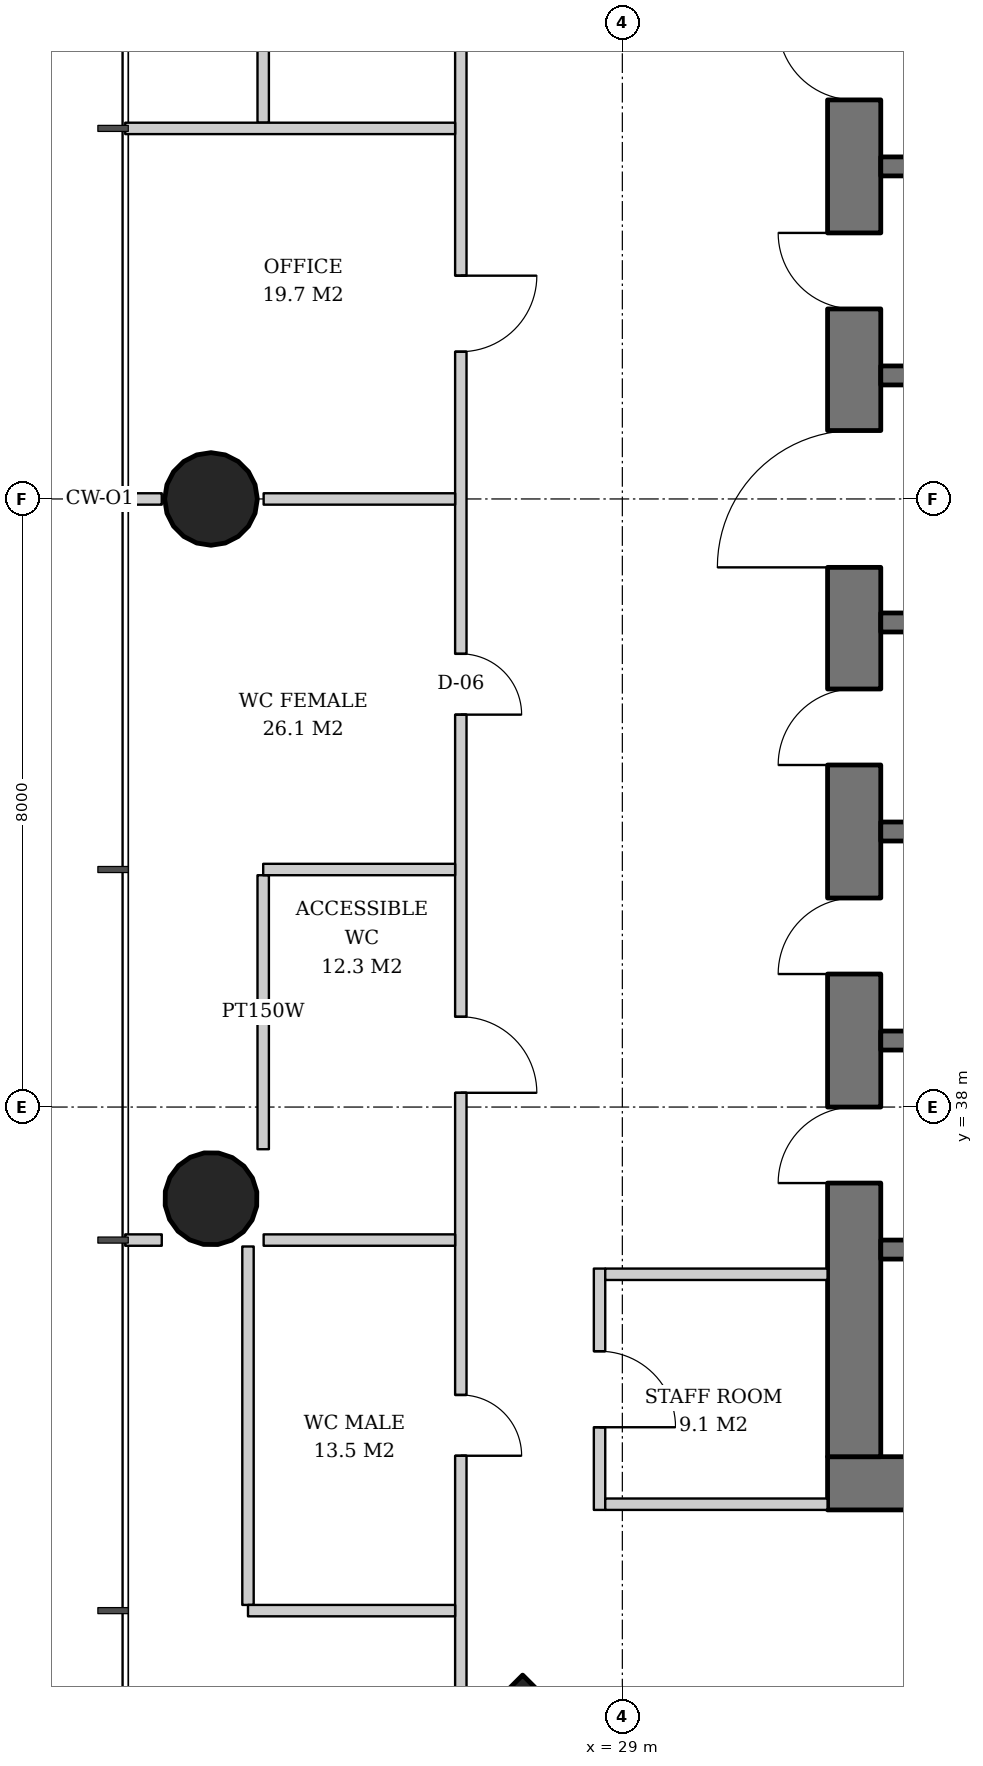
"""IFC4 building model, lengths in metres.
Left out: names, types, materials, properties, quantities, classifications, styles, units other than length and angle.
Written with IfcOpenShell. Run it as: python <this file> out.ifc"""

import sys

from ifc_helpers import new_model, si_unit, direction, frame, frame_2d, origin, origin_2d, place, context, subcontext, project, spatial, rectangle, hollow_circle, extrude, element, fill, save


model = new_model("IFC4")
c1 = context("Model", 3, precision=1e-05, world=origin(), true_north=direction((0.0, 1.0)))
c2 = subcontext(c1, "Body", "Model", "MODEL_VIEW")
j1 = project(units=[si_unit("LENGTHUNIT", "METRE"), si_unit("PLANEANGLEUNIT", "RADIAN")], contexts=[c1])
p1 = place(None, origin())
s1 = spatial("IfcSite", under=j1, at=p1, CompositionType="ELEMENT")
p2 = place(p1, origin())
s2 = spatial("IfcBuilding", under=s1, at=p2, CompositionType="ELEMENT")
p3 = place(p2, frame((0.0, 0.0, 100.8)))
s3 = spatial("IfcBuildingStorey", under=s2, at=p3, CompositionType="ELEMENT", Elevation=100.8)
p4 = place(p3, frame((27.65, 28.65, 0.0), z_axis=(0.031962158256, 0.031962158256, 0.998977898093), x_axis=(-0.707106781187, 0.707106781187, 0.0)))
e1 = element("IfcColumn", 1, at=p4, inside=s3, PredefinedType="COLUMN", context=c2, shape_type="SweptSolid", body=[
    extrude(rectangle(XDim=2.6, YDim=2.6, at=origin_2d()), origin(), (0.0, 0.0, 1.0), 3.804),
])
p5 = place(p3, frame((23.55, 46.0, 0.0), z_axis=(0.031914348339, 0.0, 0.999490607445), x_axis=(0.0, 1.0, 0.0)))
e2 = element("IfcColumn", 2, at=p5, inside=s3, PredefinedType="COLUMN", context=c2, shape_type="SweptSolid", body=[
    extrude(hollow_circle(Radius=0.61, WallThickness=0.04, at=origin_2d()), origin(), (0.0, 0.0, 1.0), 3.802),
])
p6 = place(p3, frame((23.55, 36.775, 0.0), z_axis=(0.031910269556, 0.015987237665, 0.999362868496), x_axis=(-0.447933021895, 0.894067115991, 0.0)))
e3 = element("IfcColumn", 3, at=p6, inside=s3, PredefinedType="COLUMN", context=c2, shape_type="SweptSolid", body=[
    extrude(hollow_circle(Radius=0.61, WallThickness=0.04, at=origin_2d()), origin(), (0.0, 0.0, 1.0), 3.802),
])
p7 = place(p3, frame((31.7, 33.05, 0.0), z_axis=(0.0, 0.0, 1.0), x_axis=(1.0, 0.0, 0.0)))
e4 = element("IfcWall", 4, at=p7, inside=s3, PredefinedType="SHEAR", context=c2, shape_type="SweptSolid", body=[
    extrude(rectangle(XDim=26.6, YDim=0.7, at=frame_2d((13.3, 0.0))), origin(), (0.0, 0.0, 1.0), 3.8),
])
p8 = place(p7, frame((7.3, 0.0, 0.0)))
e5 = element("IfcOpeningElement", 5, at=p8, cuts=e4, PredefinedType="OPENING", context=c2, shape_type="SweptSolid", body=[
    extrude(rectangle(XDim=1.0, YDim=2.1, at=frame_2d((0.5, 1.05))), frame((0.0, 0.36, 0.0), z_axis=(0.0, -1.0, 0.0), x_axis=(1.0, 0.0, 0.0)), (0.0, 0.0, 1.0), 0.72),
])
p9 = place(p7, frame((18.75, 0.0, 0.0)))
e6 = element("IfcOpeningElement", 6, at=p9, cuts=e4, PredefinedType="OPENING", context=c2, shape_type="SweptSolid", body=[
    extrude(rectangle(XDim=1.0, YDim=2.1, at=frame_2d((0.5, 1.05))), frame((0.0, 0.36, 0.0), z_axis=(0.0, -1.0, 0.0), x_axis=(1.0, 0.0, 0.0)), (0.0, 0.0, 1.0), 0.72),
])
p10 = place(p7, frame((3.2, 0.0, 0.0)))
e7 = element("IfcOpeningElement", 7, at=p10, cuts=e4, PredefinedType="OPENING", context=c2, shape_type="SweptSolid", body=[
    extrude(rectangle(XDim=1.0, YDim=2.1, at=frame_2d((0.5, 1.05))), frame((0.0, 0.36, 0.0), z_axis=(0.0, -1.0, 0.0), x_axis=(1.0, 0.0, 0.0)), (0.0, 0.0, 1.0), 0.72),
])
p11 = place(p7, frame((10.42, 0.0, 0.0)))
e8 = element("IfcOpeningElement", 8, at=p11, cuts=e4, PredefinedType="OPENING", context=c2, shape_type="SweptSolid", body=[
    extrude(rectangle(XDim=1.0, YDim=2.1, at=frame_2d((0.5, 1.05))), frame((0.0, 0.36, 0.0), z_axis=(0.0, -1.0, 0.0), x_axis=(1.0, 0.0, 0.0)), (0.0, 0.0, 1.0), 0.72),
])
p12 = place(p7, frame((14.46, 0.0, 0.0)))
e9 = element("IfcOpeningElement", 9, at=p12, cuts=e4, PredefinedType="OPENING", context=c2, shape_type="SweptSolid", body=[
    extrude(rectangle(XDim=1.0, YDim=2.1, at=frame_2d((0.5, 1.05))), frame((0.0, 0.36, 0.0), z_axis=(0.0, -1.0, 0.0), x_axis=(1.0, 0.0, 0.0)), (0.0, 0.0, 1.0), 0.72),
])
p13 = place(p7, frame((22.5, 0.0, 0.0)))
e10 = element("IfcOpeningElement", 10, at=p13, cuts=e4, PredefinedType="OPENING", context=c2, shape_type="SweptSolid", body=[
    extrude(rectangle(XDim=1.0, YDim=2.1, at=frame_2d((0.5, 1.05))), frame((0.0, 0.36, 0.0), z_axis=(0.0, -1.0, 0.0), x_axis=(1.0, 0.0, 0.0)), (0.0, 0.0, 1.0), 0.72),
])
p14 = place(p3, frame((32.05, 33.4, 0.0), z_axis=(0.0, 0.0, 1.0), x_axis=(0.0, 1.0, 0.0)))
e11 = element("IfcWall", 11, at=p14, inside=s3, PredefinedType="SHEAR", context=c2, shape_type="SweptSolid", body=[
    extrude(rectangle(XDim=25.2, YDim=0.7, at=frame_2d((12.6, 0.0))), origin(), (0.0, 0.0, 1.0), 3.8),
])
p15 = place(p14, frame((11.7, 0.0, 0.0)))
e12 = element("IfcOpeningElement", 12, at=p15, cuts=e11, PredefinedType="OPENING", context=c2, shape_type="SweptSolid", body=[
    extrude(rectangle(XDim=1.8, YDim=2.4, at=frame_2d((0.9, 1.2))), frame((0.0, 0.36, 0.0), z_axis=(0.0, -1.0, 0.0), x_axis=(1.0, 0.0, 0.0)), (0.0, 0.0, 1.0), 0.72),
])
p16 = place(p14, frame((3.6, 0.0, 0.0)))
e13 = element("IfcOpeningElement", 13, at=p16, cuts=e11, PredefinedType="OPENING", context=c2, shape_type="SweptSolid", body=[
    extrude(rectangle(XDim=1.0, YDim=2.1, at=frame_2d((0.5, 1.05))), frame((0.0, 0.36, 0.0), z_axis=(0.0, -1.0, 0.0), x_axis=(1.0, 0.0, 0.0)), (0.0, 0.0, 1.0), 0.72),
])
p17 = place(p14, frame((6.35, 0.0, 0.0)))
e14 = element("IfcOpeningElement", 14, at=p17, cuts=e11, PredefinedType="OPENING", context=c2, shape_type="SweptSolid", body=[
    extrude(rectangle(XDim=1.0, YDim=2.1, at=frame_2d((0.5, 1.05))), frame((0.0, 0.36, 0.0), z_axis=(0.0, -1.0, 0.0), x_axis=(1.0, 0.0, 0.0)), (0.0, 0.0, 1.0), 0.72),
])
p18 = place(p14, frame((9.1, 0.0, 0.0)))
e15 = element("IfcOpeningElement", 15, at=p18, cuts=e11, PredefinedType="OPENING", context=c2, shape_type="SweptSolid", body=[
    extrude(rectangle(XDim=1.0, YDim=2.1, at=frame_2d((0.5, 1.05))), frame((0.0, 0.36, 0.0), z_axis=(0.0, -1.0, 0.0), x_axis=(1.0, 0.0, 0.0)), (0.0, 0.0, 1.0), 0.72),
])
p19 = place(p14, frame((15.1, 0.0, 0.0)))
e16 = element("IfcOpeningElement", 16, at=p19, cuts=e11, PredefinedType="OPENING", context=c2, shape_type="SweptSolid", body=[
    extrude(rectangle(XDim=1.0, YDim=2.1, at=frame_2d((0.5, 1.05))), frame((0.0, 0.36, 0.0), z_axis=(0.0, -1.0, 0.0), x_axis=(1.0, 0.0, 0.0)), (0.0, 0.0, 1.0), 0.72),
])
p20 = place(p14, frame((17.85, 0.0, 0.0)))
e17 = element("IfcOpeningElement", 17, at=p20, cuts=e11, PredefinedType="OPENING", context=c2, shape_type="SweptSolid", body=[
    extrude(rectangle(XDim=1.0, YDim=2.1, at=frame_2d((0.5, 1.05))), frame((0.0, 0.36, 0.0), z_axis=(0.0, -1.0, 0.0), x_axis=(1.0, 0.0, 0.0)), (0.0, 0.0, 1.0), 0.72),
])
for number, where, z_axis, x_axis in (
    (18, (32.4, 36.125, 0.0), (0.0, 0.0, 1.0), (1.0, 0.0, 0.0)),
    (19, (32.4, 38.875, 0.0), (0.0, 0.0, 1.0), (1.0, 0.0, 0.0)),
    (20, (32.4, 41.625, 0.0), (0.0, 0.0, 1.0), (1.0, 0.0, 0.0)),
    (21, (32.4, 44.375, 0.0), (0.0, 0.0, 1.0), (1.0, 0.0, 0.0)),
    (22, (32.4, 47.625, 0.0), (0.0, 0.0, 1.0), (1.0, 0.0, 0.0)),
    (23, (32.4, 50.375, 0.0), (0.0, 0.0, 1.0), (1.0, 0.0, 0.0)),
):
    element("IfcWall", number, at=place(p3, frame(where, z_axis=z_axis, x_axis=x_axis)), inside=s3, PredefinedType="SHEAR", context=c2, shape_type="SweptSolid", body=[
        extrude(rectangle(XDim=2.7, YDim=0.25, at=frame_2d((1.35, 0.0))), origin(), (0.0, 0.0, 1.0), 3.8),
    ])
p21 = place(p3, frame((28.7, 35.875, 0.0), z_axis=(0.0, 0.0, 1.0), x_axis=(0.0, -1.0, 0.0)))
e24 = element("IfcWall", 24, at=p21, inside=s3, PredefinedType="PARTITIONING", context=c2, shape_type="SweptSolid", body=[
    extrude(rectangle(XDim=3.175, YDim=0.15, at=frame_2d((1.587, 0.0))), origin(), (0.0, 0.0, 1.0), 3.62),
])
p22 = place(p21, frame((1.087, 0.0, 0.0)))
e25 = element("IfcOpeningElement", 25, at=p22, cuts=e24, PredefinedType="OPENING", context=c2, shape_type="SweptSolid", body=[
    extrude(rectangle(XDim=1.0, YDim=2.1, at=frame_2d((0.5, 1.05))), frame((0.0, 0.085, 0.0), z_axis=(0.0, -1.0, 0.0), x_axis=(1.0, 0.0, 0.0)), (0.0, 0.0, 1.0), 0.17),
])
for number, where, z_axis, x_axis in (
    (26, (31.7, 35.8, 0.0), (0.0, 0.0, 1.0), (-1.0, 0.0, 0.0)),
    (27, (31.7, 32.775, 0.0), (0.0, 0.0, 1.0), (-1.0, 0.0, 0.0)),
):
    element("IfcWall", number, at=place(p3, frame(where, z_axis=z_axis, x_axis=x_axis)), inside=s3, PredefinedType="PARTITIONING", context=c2, shape_type="SweptSolid", body=[
        extrude(rectangle(XDim=2.925, YDim=0.15, at=frame_2d((1.462, 0.0))), origin(), (0.0, 0.0, 1.0), 3.62),
    ])
p23 = place(p3, frame((24.275, 54.555, 0.0), z_axis=(0.0, 0.0, 1.0), x_axis=(0.0, -1.0, 0.0)))
e28 = element("IfcWall", 28, at=p23, inside=s3, PredefinedType="PARTITIONING", context=c2, shape_type="SweptSolid", body=[
    extrude(rectangle(XDim=3.605, YDim=0.15, at=frame_2d((1.802, 0.0))), origin(), (0.0, 0.0, 1.0), 2.858),
])
p24 = place(p3, frame((24.275, 41.05, 0.0), z_axis=(0.0, 0.0, 1.0), x_axis=(0.0, -1.0, 0.0)))
e29 = element("IfcWall", 29, at=p24, inside=s3, PredefinedType="PARTITIONING", context=c2, shape_type="SweptSolid", body=[
    extrude(rectangle(XDim=3.605, YDim=0.15, at=frame_2d((1.802, 0.0))), origin(), (0.0, 0.0, 1.0), 2.806),
])
p25 = place(p3, frame((24.075, 36.166, 0.0), z_axis=(0.0, 0.0, 1.0), x_axis=(0.0, -1.0, 0.0)))
e30 = element("IfcWall", 30, at=p25, inside=s3, PredefinedType="PARTITIONING", context=c2, shape_type="SweptSolid", body=[
    extrude(rectangle(XDim=4.716, YDim=0.15, at=frame_2d((2.358, 0.0))), origin(), (0.0, 0.0, 1.0), 3.62),
])
p26 = place(p3, frame((26.875, 62.211, 0.0), z_axis=(0.0, 0.0, 1.0), x_axis=(0.0, -1.0, 0.0)))
e31 = element("IfcWall", 31, at=p26, inside=s3, PredefinedType="PARTITIONING", context=c2, shape_type="SweptSolid", body=[
    extrude(rectangle(XDim=32.423, YDim=0.15, at=frame_2d((16.211, 0.0))), origin(), (0.0, 0.0, 1.0), 2.72),
])
p27 = place(p26, frame((3.524, 0.0, 0.0)))
e32 = element("IfcOpeningElement", 32, at=p27, cuts=e31, PredefinedType="OPENING", context=c2, shape_type="SweptSolid", body=[
    extrude(rectangle(XDim=1.0, YDim=2.1, at=frame_2d((0.5, 1.05))), frame((0.0, 0.085, 0.0), z_axis=(0.0, -1.0, 0.0), x_axis=(1.0, 0.0, 0.0)), (0.0, 0.0, 1.0), 0.17),
])
p28 = place(p26, frame((8.399, 0.0, 0.0)))
e33 = element("IfcOpeningElement", 33, at=p28, cuts=e31, PredefinedType="OPENING", context=c2, shape_type="SweptSolid", body=[
    extrude(rectangle(XDim=1.0, YDim=2.1, at=frame_2d((0.5, 1.05))), frame((0.0, 0.085, 0.0), z_axis=(0.0, -1.0, 0.0), x_axis=(1.0, 0.0, 0.0)), (0.0, 0.0, 1.0), 0.17),
])
p29 = place(p26, frame((13.274, 0.0, 0.0)))
e34 = element("IfcOpeningElement", 34, at=p29, cuts=e31, PredefinedType="OPENING", context=c2, shape_type="SweptSolid", body=[
    extrude(rectangle(XDim=1.0, YDim=2.1, at=frame_2d((0.5, 1.05))), frame((0.0, 0.085, 0.0), z_axis=(0.0, -1.0, 0.0), x_axis=(1.0, 0.0, 0.0)), (0.0, 0.0, 1.0), 0.17),
])
p30 = place(p26, frame((18.249, 0.0, 0.0)))
e35 = element("IfcOpeningElement", 35, at=p30, cuts=e31, PredefinedType="OPENING", context=c2, shape_type="SweptSolid", body=[
    extrude(rectangle(XDim=0.8, YDim=2.1, at=frame_2d((0.4, 1.05))), frame((0.0, 0.085, 0.0), z_axis=(0.0, -1.0, 0.0), x_axis=(1.0, 0.0, 0.0)), (0.0, 0.0, 1.0), 0.17),
])
p31 = place(p26, frame((23.024, 0.0, 0.0)))
e36 = element("IfcOpeningElement", 36, at=p31, cuts=e31, PredefinedType="OPENING", context=c2, shape_type="SweptSolid", body=[
    extrude(rectangle(XDim=1.0, YDim=2.1, at=frame_2d((0.5, 1.05))), frame((0.0, 0.085, 0.0), z_axis=(0.0, -1.0, 0.0), x_axis=(1.0, 0.0, 0.0)), (0.0, 0.0, 1.0), 0.17),
])
p32 = place(p26, frame((27.999, 0.0, 0.0)))
e37 = element("IfcOpeningElement", 37, at=p32, cuts=e31, PredefinedType="OPENING", context=c2, shape_type="SweptSolid", body=[
    extrude(rectangle(XDim=0.8, YDim=2.1, at=frame_2d((0.4, 1.05))), frame((0.0, 0.085, 0.0), z_axis=(0.0, -1.0, 0.0), x_axis=(1.0, 0.0, 0.0)), (0.0, 0.0, 1.0), 0.17),
])
p33 = place(p3, frame((26.8, 50.875, 0.0), z_axis=(0.0, 0.0, 1.0), x_axis=(-1.0, 0.0, 0.0)))
e38 = element("IfcWall", 38, at=p33, inside=s3, PredefinedType="PARTITIONING", context=c2, shape_type="SweptSolid", body=[
    extrude(rectangle(XDim=4.34, YDim=0.15, at=frame_2d((2.17, 0.0))), origin(), (0.0, 0.0, 1.0), 2.82),
])
p34 = place(p3, frame((26.8, 46.0, 0.0), z_axis=(0.0, 0.0, 1.0), x_axis=(-1.0, 0.0, 0.0)))
e39 = element("IfcWall", 39, at=p34, inside=s3, PredefinedType="PARTITIONING", context=c2, shape_type="SweptSolid", body=[
    extrude(rectangle(XDim=2.519, YDim=0.15, at=frame_2d((1.26, 0.0))), origin(), (0.0, 0.0, 1.0), 2.858),
])
p35 = place(p3, frame((22.94, 46.0, 0.0), z_axis=(0.0, 0.0, 1.0), x_axis=(-1.0, 0.0, 0.0)))
e40 = element("IfcWall", 40, at=p35, inside=s3, PredefinedType="PARTITIONING", context=c2, shape_type="SweptSolid", body=[
    extrude(rectangle(XDim=0.48, YDim=0.15, at=frame_2d((0.24, 0.0))), origin(), (0.0, 0.0, 1.0), 3.62),
])
p36 = place(p3, frame((26.8, 41.125, 0.0), z_axis=(0.0, 0.0, 1.0), x_axis=(-1.0, 0.0, 0.0)))
e41 = element("IfcWall", 41, at=p36, inside=s3, PredefinedType="PARTITIONING", context=c2, shape_type="SweptSolid", body=[
    extrude(rectangle(XDim=2.525, YDim=0.15, at=frame_2d((1.263, 0.0))), origin(), (0.0, 0.0, 1.0), 3.62),
])
p37 = place(p3, frame((26.8, 36.25, 0.0), z_axis=(0.0, 0.0, 1.0), x_axis=(-1.0, 0.0, 0.0)))
e42 = element("IfcWall", 42, at=p37, inside=s3, PredefinedType="PARTITIONING", context=c2, shape_type="SweptSolid", body=[
    extrude(rectangle(XDim=2.519, YDim=0.15, at=frame_2d((1.26, 0.0))), origin(), (0.0, 0.0, 1.0), 3.62),
])
p38 = place(p3, frame((22.94, 36.25, 0.0), z_axis=(0.0, 0.0, 1.0), x_axis=(-1.0, 0.0, 0.0)))
e43 = element("IfcWall", 43, at=p38, inside=s3, PredefinedType="PARTITIONING", context=c2, shape_type="SweptSolid", body=[
    extrude(rectangle(XDim=0.48, YDim=0.15, at=frame_2d((0.24, 0.0))), origin(), (0.0, 0.0, 1.0), 3.62),
])
p39 = place(p3, frame((26.8, 31.375, 0.0), z_axis=(0.0, 0.0, 1.0), x_axis=(-1.0, 0.0, 0.0)))
e44 = element("IfcWall", 44, at=p39, inside=s3, PredefinedType="PARTITIONING", context=c2, shape_type="SweptSolid", body=[
    extrude(rectangle(XDim=2.725, YDim=0.15, at=frame_2d((1.363, 0.0))), origin(), (0.0, 0.0, 1.0), 3.62),
])
p40 = place(p15, origin())
e45 = element("IfcDoor", 45, at=p40, inside=s3, OperationType="DOUBLE_DOOR_SINGLE_SWING", PredefinedType="DOOR", context=c2, shape_type="SweptSolid", body=[
    extrude(rectangle(XDim=1.8, YDim=2.4, at=frame_2d((0.9, 1.2))), frame((0.0, 0.025, 0.0), z_axis=(0.0, -1.0, 0.0), x_axis=(1.0, 0.0, 0.0)), (0.0, 0.0, 1.0), 0.05),
])
fill(e12, e45)
p41 = place(p16, origin())
e46 = element("IfcDoor", 46, at=p41, inside=s3, OperationType="SINGLE_SWING_LEFT", PredefinedType="DOOR", context=c2, shape_type="SweptSolid", body=[
    extrude(rectangle(XDim=1.0, YDim=2.1, at=frame_2d((0.5, 1.05))), frame((0.0, -0.29, 0.0), z_axis=(0.0, -1.0, 0.0), x_axis=(1.0, 0.0, 0.0)), (0.0, 0.0, 1.0), 0.05),
])
fill(e13, e46)
p42 = place(p17, origin())
e47 = element("IfcDoor", 47, at=p42, inside=s3, OperationType="SINGLE_SWING_LEFT", PredefinedType="DOOR", context=c2, shape_type="SweptSolid", body=[
    extrude(rectangle(XDim=1.0, YDim=2.1, at=frame_2d((0.5, 1.05))), frame((0.0, -0.29, 0.0), z_axis=(0.0, -1.0, 0.0), x_axis=(1.0, 0.0, 0.0)), (0.0, 0.0, 1.0), 0.05),
])
fill(e14, e47)
p43 = place(p18, origin())
e48 = element("IfcDoor", 48, at=p43, inside=s3, OperationType="SINGLE_SWING_LEFT", PredefinedType="DOOR", context=c2, shape_type="SweptSolid", body=[
    extrude(rectangle(XDim=1.0, YDim=2.1, at=frame_2d((0.5, 1.05))), frame((0.0, -0.29, 0.0), z_axis=(0.0, -1.0, 0.0), x_axis=(1.0, 0.0, 0.0)), (0.0, 0.0, 1.0), 0.05),
])
fill(e15, e48)
p44 = place(p19, origin())
e49 = element("IfcDoor", 49, at=p44, inside=s3, OperationType="SINGLE_SWING_RIGHT", PredefinedType="DOOR", context=c2, shape_type="SweptSolid", body=[
    extrude(rectangle(XDim=1.0, YDim=2.1, at=frame_2d((0.5, 1.05))), frame((0.0, -0.29, 0.0), z_axis=(0.0, -1.0, 0.0), x_axis=(1.0, 0.0, 0.0)), (0.0, 0.0, 1.0), 0.05),
])
fill(e16, e49)
p45 = place(p20, origin())
e50 = element("IfcDoor", 50, at=p45, inside=s3, OperationType="SINGLE_SWING_RIGHT", PredefinedType="DOOR", context=c2, shape_type="SweptSolid", body=[
    extrude(rectangle(XDim=1.0, YDim=2.1, at=frame_2d((0.5, 1.05))), frame((0.0, -0.29, 0.0), z_axis=(0.0, -1.0, 0.0), x_axis=(1.0, 0.0, 0.0)), (0.0, 0.0, 1.0), 0.05),
])
fill(e17, e50)
p46 = place(p22, origin())
e51 = element("IfcDoor", 51, at=p46, inside=s3, OperationType="SINGLE_SWING_RIGHT", PredefinedType="DOOR", context=c2, shape_type="SweptSolid", body=[
    extrude(rectangle(XDim=1.0, YDim=2.1, at=frame_2d((0.5, 1.05))), frame((0.0, 0.025, 0.0), z_axis=(0.0, -1.0, 0.0), x_axis=(1.0, 0.0, 0.0)), (0.0, 0.0, 1.0), 0.05),
])
fill(e25, e51)
p47 = place(p29, origin())
e52 = element("IfcDoor", 52, at=p47, inside=s3, OperationType="SINGLE_SWING_LEFT", PredefinedType="DOOR", context=c2, shape_type="SweptSolid", body=[
    extrude(rectangle(XDim=1.0, YDim=2.1, at=frame_2d((0.5, 1.05))), frame((0.0, 0.025, 0.0), z_axis=(0.0, -1.0, 0.0), x_axis=(1.0, 0.0, 0.0)), (0.0, 0.0, 1.0), 0.05),
])
fill(e34, e52)
p48 = place(p30, origin())
e53 = element("IfcDoor", 53, at=p48, inside=s3, OperationType="SINGLE_SWING_RIGHT", PredefinedType="DOOR", context=c2, shape_type="SweptSolid", body=[
    extrude(rectangle(XDim=0.8, YDim=2.1, at=frame_2d((0.4, 1.05))), frame((0.0, 0.025, 0.0), z_axis=(0.0, -1.0, 0.0), x_axis=(1.0, 0.0, 0.0)), (0.0, 0.0, 1.0), 0.05),
])
fill(e35, e53)
p49 = place(p31, origin())
e54 = element("IfcDoor", 54, at=p49, inside=s3, OperationType="SINGLE_SWING_RIGHT", PredefinedType="DOOR", context=c2, shape_type="SweptSolid", body=[
    extrude(rectangle(XDim=1.0, YDim=2.1, at=frame_2d((0.5, 1.05))), frame((0.0, 0.025, 0.0), z_axis=(0.0, -1.0, 0.0), x_axis=(1.0, 0.0, 0.0)), (0.0, 0.0, 1.0), 0.05),
])
fill(e36, e54)
p50 = place(p32, origin())
e55 = element("IfcDoor", 55, at=p50, inside=s3, OperationType="SINGLE_SWING_RIGHT", PredefinedType="DOOR", context=c2, shape_type="SweptSolid", body=[
    extrude(rectangle(XDim=0.8, YDim=2.1, at=frame_2d((0.4, 1.05))), frame((0.0, 0.025, 0.0), z_axis=(0.0, -1.0, 0.0), x_axis=(1.0, 0.0, 0.0)), (0.0, 0.0, 1.0), 0.05),
])
fill(e37, e55)
save(model, sys.argv[1])
